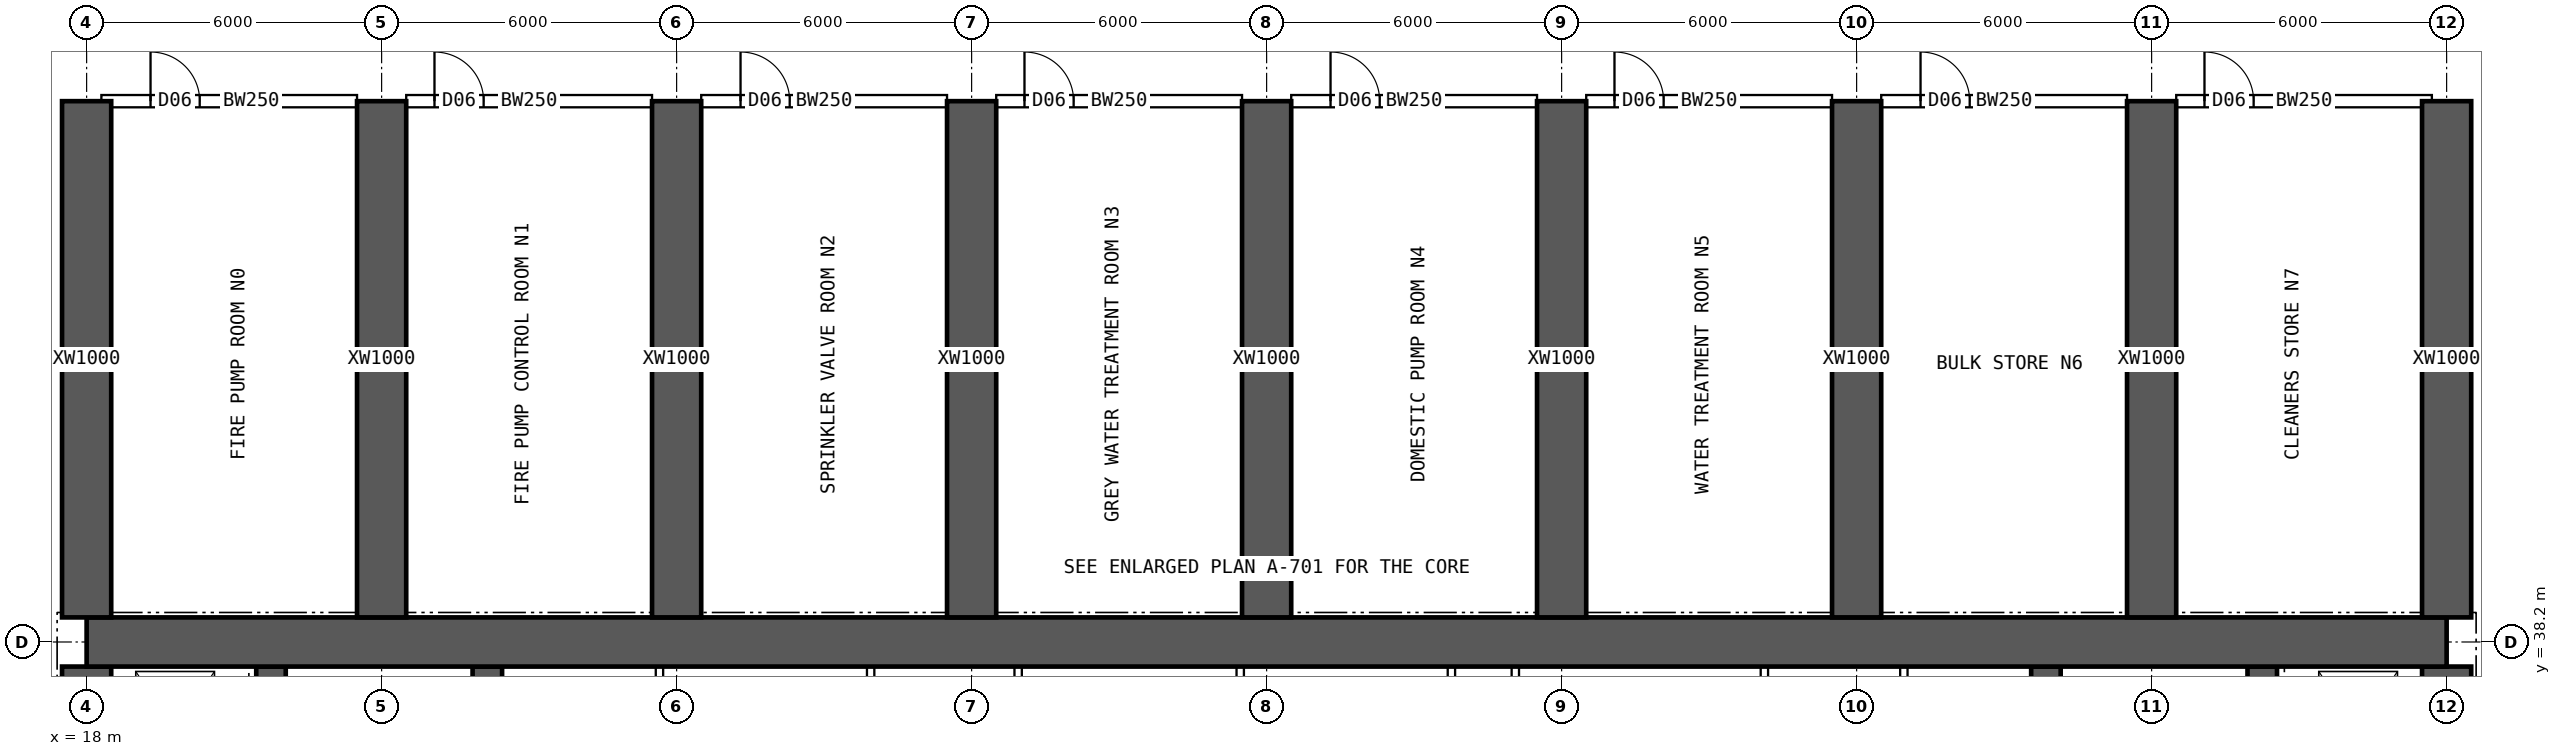
"""IFC4 building model, lengths in metres.
Left out: names, types, materials, properties, quantities, classifications, styles, units other than length and angle.
Written with IfcOpenShell. Run it as: python <this file> out.ifc"""

import sys

from ifc_helpers import new_model, si_unit, direction, frame, frame_2d, origin, place, context, subcontext, project, spatial, rectangle, extrude, element, fill, save


model = new_model("IFC4")
c1 = context("Model", 3, precision=1e-05, world=origin(), true_north=direction((0.0, 1.0)))
c2 = subcontext(c1, "Body", "Model", "MODEL_VIEW")
j1 = project(units=[si_unit("LENGTHUNIT", "METRE"), si_unit("PLANEANGLEUNIT", "RADIAN")], contexts=[c1])
p1 = place(None, origin())
s1 = spatial("IfcSite", under=j1, at=p1, CompositionType="ELEMENT")
p2 = place(p1, origin())
s2 = spatial("IfcBuilding", under=s1, at=p2, CompositionType="ELEMENT")
p3 = place(p2, frame((0.0, 0.0, -9.0)))
s3 = spatial("IfcBuildingStorey", under=s2, at=p3, CompositionType="ELEMENT", Elevation=-9.0)
p4 = place(p3, frame((18.0, 38.2, 0.0), z_axis=(0.0, 0.0, 1.0), x_axis=(1.0, 0.0, 0.0)))
e1 = element("IfcWall", 1, at=p4, inside=s3, PredefinedType="SHEAR", context=c2, shape_type="SweptSolid", body=[
    extrude(rectangle(XDim=48.0, YDim=1.0, at=frame_2d((24.0, 0.0))), origin(), (0.0, 0.0, 1.0), 4.5),
])
p5 = place(p3, frame((18.0, 26.3, 0.0), z_axis=(0.0, 0.0, 1.0), x_axis=(0.0, 1.0, 0.0)))
e2 = element("IfcWall", 2, at=p5, inside=s3, PredefinedType="SHEAR", context=c2, shape_type="SweptSolid", body=[
    extrude(rectangle(XDim=11.4, YDim=1.0, at=frame_2d((5.7, 0.0))), origin(), (0.0, 0.0, 1.0), 4.5),
])
p6 = place(p5, frame((5.0, 0.0, 0.0)))
e3 = element("IfcOpeningElement", 3, at=p6, cuts=e2, PredefinedType="OPENING", context=c2, shape_type="SweptSolid", body=[
    extrude(rectangle(XDim=1.2, YDim=2.1, at=frame_2d((0.6, 1.05))), frame((0.0, 0.51, 0.0), z_axis=(0.0, -1.0, 0.0), x_axis=(1.0, 0.0, 0.0)), (0.0, 0.0, 1.0), 1.02),
])
p7 = place(p3, frame((66.0, 26.3, 0.0), z_axis=(0.0, 0.0, 1.0), x_axis=(0.0, 1.0, 0.0)))
e4 = element("IfcWall", 4, at=p7, inside=s3, PredefinedType="SHEAR", context=c2, shape_type="SweptSolid", body=[
    extrude(rectangle(XDim=11.4, YDim=1.0, at=frame_2d((5.7, 0.0))), origin(), (0.0, 0.0, 1.0), 4.5),
])
p8 = place(p7, frame((5.0, 0.0, 0.0)))
e5 = element("IfcOpeningElement", 5, at=p8, cuts=e4, PredefinedType="OPENING", context=c2, shape_type="SweptSolid", body=[
    extrude(rectangle(XDim=1.2, YDim=2.1, at=frame_2d((0.6, 1.05))), frame((0.0, 0.51, 0.0), z_axis=(0.0, -1.0, 0.0), x_axis=(1.0, 0.0, 0.0)), (0.0, 0.0, 1.0), 1.02),
])
for number, where, z_axis, x_axis in (
    (6, (21.75, 34.75, 0.0), (0.0, 0.0, 1.0), (0.0, 1.0, 0.0)),
    (7, (62.25, 34.75, 0.0), (0.0, 0.0, 1.0), (0.0, 1.0, 0.0)),
    (8, (26.15, 34.75, 0.0), (0.0, 0.0, 1.0), (0.0, 1.0, 0.0)),
    (9, (57.85, 34.75, 0.0), (0.0, 0.0, 1.0), (0.0, 1.0, 0.0)),
):
    element("IfcWall", number, at=place(p3, frame(where, z_axis=z_axis, x_axis=x_axis)), inside=s3, PredefinedType="SHEAR", context=c2, shape_type="SweptSolid", body=[
        extrude(rectangle(XDim=2.95, YDim=0.6, at=frame_2d((1.475, 0.0))), origin(), (0.0, 0.0, 1.0), 4.5),
    ])
for number, where, z_axis, x_axis in (
    (10, (18.0, 38.7, 0.0), (0.0, 0.0, 1.0), (0.0, 1.0, 0.0)),
    (11, (24.0, 38.7, 0.0), (0.0, 0.0, 1.0), (0.0, 1.0, 0.0)),
    (12, (30.0, 38.7, 0.0), (0.0, 0.0, 1.0), (0.0, 1.0, 0.0)),
    (13, (36.0, 38.7, 0.0), (0.0, 0.0, 1.0), (0.0, 1.0, 0.0)),
    (14, (42.0, 38.7, 0.0), (0.0, 0.0, 1.0), (0.0, 1.0, 0.0)),
    (15, (48.0, 38.7, 0.0), (0.0, 0.0, 1.0), (0.0, 1.0, 0.0)),
    (16, (54.0, 38.7, 0.0), (0.0, 0.0, 1.0), (0.0, 1.0, 0.0)),
    (17, (60.0, 38.7, 0.0), (0.0, 0.0, 1.0), (0.0, 1.0, 0.0)),
    (18, (66.0, 38.7, 0.0), (0.0, 0.0, 1.0), (0.0, 1.0, 0.0)),
):
    element("IfcWall", number, at=place(p3, frame(where, z_axis=z_axis, x_axis=x_axis)), inside=s3, PredefinedType="SHEAR", context=c2, shape_type="SweptSolid", body=[
        extrude(rectangle(XDim=10.5, YDim=1.0, at=frame_2d((5.25, 0.0))), origin(), (0.0, 0.0, 1.0), 4.5),
    ])
for number, where, z_axis, x_axis in (
    (19, (29.651, 34.75, 0.0), (0.0, 0.0, 1.0), (0.0, 1.0, 0.0)),
    (20, (33.946, 34.75, 0.0), (0.0, 0.0, 1.0), (0.0, 1.0, 0.0)),
    (21, (36.946, 34.75, 0.0), (0.0, 0.0, 1.0), (0.0, 1.0, 0.0)),
    (22, (41.463, 34.75, 0.0), (0.0, 0.0, 1.0), (0.0, 1.0, 0.0)),
    (23, (45.758, 34.75, 0.0), (0.0, 0.0, 1.0), (0.0, 1.0, 0.0)),
    (24, (47.058, 34.75, 0.0), (0.0, 0.0, 1.0), (0.0, 1.0, 0.0)),
    (25, (52.124, 34.75, 0.0), (0.0, 0.0, 1.0), (0.0, 1.0, 0.0)),
    (26, (54.961, 34.75, 0.0), (0.0, 0.0, 1.0), (0.0, 1.0, 0.0)),
):
    element("IfcWall", number, at=place(p3, frame(where, z_axis=z_axis, x_axis=x_axis)), inside=s3, PredefinedType="SOLIDWALL", context=c2, shape_type="SweptSolid", body=[
        extrude(rectangle(XDim=2.95, YDim=0.15, at=frame_2d((1.475, 0.0))), origin(), (0.0, 0.0, 1.0), 4.2),
    ])
p9 = place(p3, frame((18.3, 49.2, 0.0), z_axis=(0.0, 0.0, 1.0), x_axis=(1.0, 0.0, 0.0)))
e27 = element("IfcWall", 27, at=p9, inside=s3, PredefinedType="SOLIDWALL", context=c2, shape_type="SweptSolid", body=[
    extrude(rectangle(XDim=5.2, YDim=0.25, at=frame_2d((2.6, 0.0))), origin(), (0.0, 0.0, 1.0), 4.2),
])
p10 = place(p9, frame((1.0, 0.0, 0.0)))
e28 = element("IfcOpeningElement", 28, at=p10, cuts=e27, PredefinedType="OPENING", context=c2, shape_type="SweptSolid", body=[
    extrude(rectangle(XDim=1.0, YDim=2.1, at=frame_2d((0.5, 1.05))), frame((0.0, 0.135, 0.0), z_axis=(0.0, -1.0, 0.0), x_axis=(1.0, 0.0, 0.0)), (0.0, 0.0, 1.0), 0.27),
])
p11 = place(p3, frame((24.5, 49.2, 0.0), z_axis=(0.0, 0.0, 1.0), x_axis=(1.0, 0.0, 0.0)))
e29 = element("IfcWall", 29, at=p11, inside=s3, PredefinedType="SOLIDWALL", context=c2, shape_type="SweptSolid", body=[
    extrude(rectangle(XDim=5.0, YDim=0.25, at=frame_2d((2.5, 0.0))), origin(), (0.0, 0.0, 1.0), 4.2),
])
p12 = place(p11, frame((0.575, 0.0, 0.0)))
e30 = element("IfcOpeningElement", 30, at=p12, cuts=e29, PredefinedType="OPENING", context=c2, shape_type="SweptSolid", body=[
    extrude(rectangle(XDim=1.0, YDim=2.1, at=frame_2d((0.5, 1.05))), frame((0.0, 0.135, 0.0), z_axis=(0.0, -1.0, 0.0), x_axis=(1.0, 0.0, 0.0)), (0.0, 0.0, 1.0), 0.27),
])
p13 = place(p3, frame((30.5, 49.2, 0.0), z_axis=(0.0, 0.0, 1.0), x_axis=(1.0, 0.0, 0.0)))
e31 = element("IfcWall", 31, at=p13, inside=s3, PredefinedType="SOLIDWALL", context=c2, shape_type="SweptSolid", body=[
    extrude(rectangle(XDim=5.0, YDim=0.25, at=frame_2d((2.5, 0.0))), origin(), (0.0, 0.0, 1.0), 4.2),
])
p14 = place(p13, frame((0.8, 0.0, 0.0)))
e32 = element("IfcOpeningElement", 32, at=p14, cuts=e31, PredefinedType="OPENING", context=c2, shape_type="SweptSolid", body=[
    extrude(rectangle(XDim=1.0, YDim=2.1, at=frame_2d((0.5, 1.05))), frame((0.0, 0.135, 0.0), z_axis=(0.0, -1.0, 0.0), x_axis=(1.0, 0.0, 0.0)), (0.0, 0.0, 1.0), 0.27),
])
p15 = place(p3, frame((36.5, 49.2, 0.0), z_axis=(0.0, 0.0, 1.0), x_axis=(1.0, 0.0, 0.0)))
e33 = element("IfcWall", 33, at=p15, inside=s3, PredefinedType="SOLIDWALL", context=c2, shape_type="SweptSolid", body=[
    extrude(rectangle(XDim=5.0, YDim=0.25, at=frame_2d((2.5, 0.0))), origin(), (0.0, 0.0, 1.0), 4.2),
])
p16 = place(p15, frame((0.575, 0.0, 0.0)))
e34 = element("IfcOpeningElement", 34, at=p16, cuts=e33, PredefinedType="OPENING", context=c2, shape_type="SweptSolid", body=[
    extrude(rectangle(XDim=1.0, YDim=2.1, at=frame_2d((0.5, 1.05))), frame((0.0, 0.135, 0.0), z_axis=(0.0, -1.0, 0.0), x_axis=(1.0, 0.0, 0.0)), (0.0, 0.0, 1.0), 0.27),
])
p17 = place(p3, frame((42.5, 49.2, 0.0), z_axis=(0.0, 0.0, 1.0), x_axis=(1.0, 0.0, 0.0)))
e35 = element("IfcWall", 35, at=p17, inside=s3, PredefinedType="SOLIDWALL", context=c2, shape_type="SweptSolid", body=[
    extrude(rectangle(XDim=5.0, YDim=0.25, at=frame_2d((2.5, 0.0))), origin(), (0.0, 0.0, 1.0), 4.2),
])
p18 = place(p17, frame((0.8, 0.0, 0.0)))
e36 = element("IfcOpeningElement", 36, at=p18, cuts=e35, PredefinedType="OPENING", context=c2, shape_type="SweptSolid", body=[
    extrude(rectangle(XDim=1.0, YDim=2.1, at=frame_2d((0.5, 1.05))), frame((0.0, 0.135, 0.0), z_axis=(0.0, -1.0, 0.0), x_axis=(1.0, 0.0, 0.0)), (0.0, 0.0, 1.0), 0.27),
])
p19 = place(p3, frame((48.5, 49.2, 0.0), z_axis=(0.0, 0.0, 1.0), x_axis=(1.0, 0.0, 0.0)))
e37 = element("IfcWall", 37, at=p19, inside=s3, PredefinedType="SOLIDWALL", context=c2, shape_type="SweptSolid", body=[
    extrude(rectangle(XDim=5.0, YDim=0.25, at=frame_2d((2.5, 0.0))), origin(), (0.0, 0.0, 1.0), 4.2),
])
p20 = place(p19, frame((0.575, 0.0, 0.0)))
e38 = element("IfcOpeningElement", 38, at=p20, cuts=e37, PredefinedType="OPENING", context=c2, shape_type="SweptSolid", body=[
    extrude(rectangle(XDim=1.0, YDim=2.1, at=frame_2d((0.5, 1.05))), frame((0.0, 0.135, 0.0), z_axis=(0.0, -1.0, 0.0), x_axis=(1.0, 0.0, 0.0)), (0.0, 0.0, 1.0), 0.27),
])
p21 = place(p3, frame((54.5, 49.2, 0.0), z_axis=(0.0, 0.0, 1.0), x_axis=(1.0, 0.0, 0.0)))
e39 = element("IfcWall", 39, at=p21, inside=s3, PredefinedType="SOLIDWALL", context=c2, shape_type="SweptSolid", body=[
    extrude(rectangle(XDim=5.0, YDim=0.25, at=frame_2d((2.5, 0.0))), origin(), (0.0, 0.0, 1.0), 4.2),
])
p22 = place(p21, frame((0.8, 0.0, 0.0)))
e40 = element("IfcOpeningElement", 40, at=p22, cuts=e39, PredefinedType="OPENING", context=c2, shape_type="SweptSolid", body=[
    extrude(rectangle(XDim=1.0, YDim=2.1, at=frame_2d((0.5, 1.05))), frame((0.0, 0.135, 0.0), z_axis=(0.0, -1.0, 0.0), x_axis=(1.0, 0.0, 0.0)), (0.0, 0.0, 1.0), 0.27),
])
p23 = place(p3, frame((60.5, 49.2, 0.0), z_axis=(0.0, 0.0, 1.0), x_axis=(1.0, 0.0, 0.0)))
e41 = element("IfcWall", 41, at=p23, inside=s3, PredefinedType="SOLIDWALL", context=c2, shape_type="SweptSolid", body=[
    extrude(rectangle(XDim=5.2, YDim=0.25, at=frame_2d((2.6, 0.0))), origin(), (0.0, 0.0, 1.0), 4.2),
])
p24 = place(p23, frame((0.575, 0.0, 0.0)))
e42 = element("IfcOpeningElement", 42, at=p24, cuts=e41, PredefinedType="OPENING", context=c2, shape_type="SweptSolid", body=[
    extrude(rectangle(XDim=1.0, YDim=2.1, at=frame_2d((0.5, 1.05))), frame((0.0, 0.135, 0.0), z_axis=(0.0, -1.0, 0.0), x_axis=(1.0, 0.0, 0.0)), (0.0, 0.0, 1.0), 0.27),
])
p25 = place(p10, origin())
e43 = element("IfcDoor", 43, at=p25, inside=s3, OperationType="SINGLE_SWING_LEFT", PredefinedType="DOOR", context=c2, shape_type="SweptSolid", body=[
    extrude(rectangle(XDim=1.0, YDim=2.1, at=frame_2d((0.5, 1.05))), frame((0.0, 0.025, 0.0), z_axis=(0.0, -1.0, 0.0), x_axis=(1.0, 0.0, 0.0)), (0.0, 0.0, 1.0), 0.05),
])
fill(e28, e43)
p26 = place(p12, origin())
e44 = element("IfcDoor", 44, at=p26, inside=s3, OperationType="SINGLE_SWING_LEFT", PredefinedType="DOOR", context=c2, shape_type="SweptSolid", body=[
    extrude(rectangle(XDim=1.0, YDim=2.1, at=frame_2d((0.5, 1.05))), frame((0.0, 0.025, 0.0), z_axis=(0.0, -1.0, 0.0), x_axis=(1.0, 0.0, 0.0)), (0.0, 0.0, 1.0), 0.05),
])
fill(e30, e44)
p27 = place(p14, origin())
e45 = element("IfcDoor", 45, at=p27, inside=s3, OperationType="SINGLE_SWING_LEFT", PredefinedType="DOOR", context=c2, shape_type="SweptSolid", body=[
    extrude(rectangle(XDim=1.0, YDim=2.1, at=frame_2d((0.5, 1.05))), frame((0.0, 0.025, 0.0), z_axis=(0.0, -1.0, 0.0), x_axis=(1.0, 0.0, 0.0)), (0.0, 0.0, 1.0), 0.05),
])
fill(e32, e45)
p28 = place(p16, origin())
e46 = element("IfcDoor", 46, at=p28, inside=s3, OperationType="SINGLE_SWING_LEFT", PredefinedType="DOOR", context=c2, shape_type="SweptSolid", body=[
    extrude(rectangle(XDim=1.0, YDim=2.1, at=frame_2d((0.5, 1.05))), frame((0.0, 0.025, 0.0), z_axis=(0.0, -1.0, 0.0), x_axis=(1.0, 0.0, 0.0)), (0.0, 0.0, 1.0), 0.05),
])
fill(e34, e46)
p29 = place(p18, origin())
e47 = element("IfcDoor", 47, at=p29, inside=s3, OperationType="SINGLE_SWING_LEFT", PredefinedType="DOOR", context=c2, shape_type="SweptSolid", body=[
    extrude(rectangle(XDim=1.0, YDim=2.1, at=frame_2d((0.5, 1.05))), frame((0.0, 0.025, 0.0), z_axis=(0.0, -1.0, 0.0), x_axis=(1.0, 0.0, 0.0)), (0.0, 0.0, 1.0), 0.05),
])
fill(e36, e47)
p30 = place(p20, origin())
e48 = element("IfcDoor", 48, at=p30, inside=s3, OperationType="SINGLE_SWING_LEFT", PredefinedType="DOOR", context=c2, shape_type="SweptSolid", body=[
    extrude(rectangle(XDim=1.0, YDim=2.1, at=frame_2d((0.5, 1.05))), frame((0.0, 0.025, 0.0), z_axis=(0.0, -1.0, 0.0), x_axis=(1.0, 0.0, 0.0)), (0.0, 0.0, 1.0), 0.05),
])
fill(e38, e48)
p31 = place(p22, origin())
e49 = element("IfcDoor", 49, at=p31, inside=s3, OperationType="SINGLE_SWING_LEFT", PredefinedType="DOOR", context=c2, shape_type="SweptSolid", body=[
    extrude(rectangle(XDim=1.0, YDim=2.1, at=frame_2d((0.5, 1.05))), frame((0.0, 0.025, 0.0), z_axis=(0.0, -1.0, 0.0), x_axis=(1.0, 0.0, 0.0)), (0.0, 0.0, 1.0), 0.05),
])
fill(e40, e49)
p32 = place(p24, origin())
e50 = element("IfcDoor", 50, at=p32, inside=s3, OperationType="SINGLE_SWING_LEFT", PredefinedType="DOOR", context=c2, shape_type="SweptSolid", body=[
    extrude(rectangle(XDim=1.0, YDim=2.1, at=frame_2d((0.5, 1.05))), frame((0.0, 0.025, 0.0), z_axis=(0.0, -1.0, 0.0), x_axis=(1.0, 0.0, 0.0)), (0.0, 0.0, 1.0), 0.05),
])
fill(e42, e50)
save(model, sys.argv[1])
